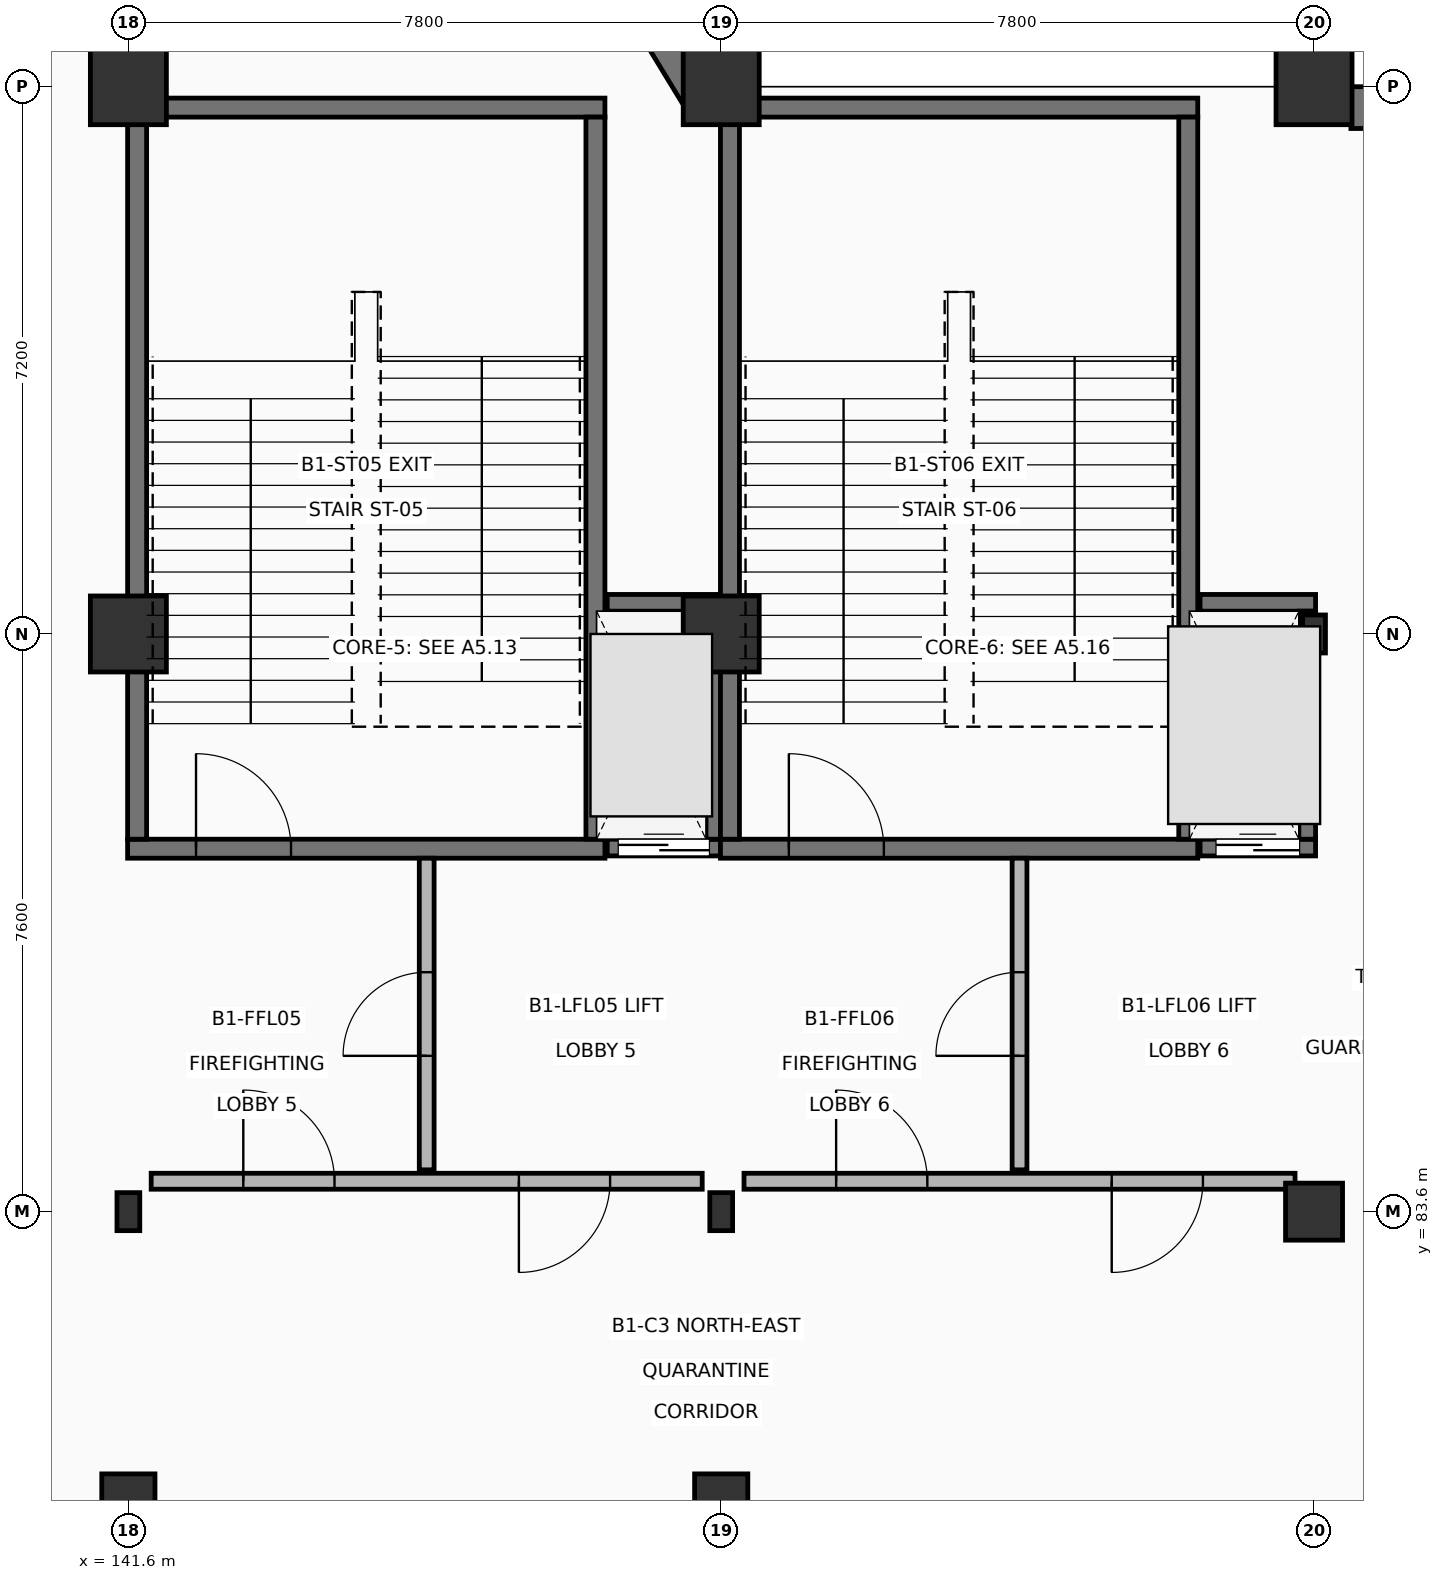
"""IFC4 building model, lengths in metres.
Left out: names, types, materials, properties, quantities, classifications, styles, units other than length and angle.
Written with IfcOpenShell. Run it as: python <this file> out.ifc"""

import sys

from ifc_helpers import new_model, si_unit, direction, frame, frame_2d, origin, origin_2d, place, context, subcontext, project, spatial, rectangle, hollow_rectangle, circle, extrude, element, fill, save


model = new_model("IFC4")
c1 = context("Model", 3, precision=1e-05, world=origin(), true_north=direction((0.0, 1.0)))
c2 = subcontext(c1, "Body", "Model", "MODEL_VIEW")
j1 = project(units=[si_unit("LENGTHUNIT", "METRE"), si_unit("PLANEANGLEUNIT", "RADIAN")], contexts=[c1])
p1 = place(None, origin())
s1 = spatial("IfcSite", under=j1, at=p1, CompositionType="ELEMENT")
p2 = place(p1, origin())
s2 = spatial("IfcBuilding", under=s1, at=p2, CompositionType="ELEMENT")
p3 = place(p2, frame((0.0, 0.0, -5.4)))
s3 = spatial("IfcBuildingStorey", under=s2, at=p3, CompositionType="ELEMENT", Elevation=-5.4)
p4 = place(p3, frame((141.6, 83.6, 0.0), z_axis=(0.0, 0.0, 1.0), x_axis=(1.0, 0.0, 0.0)))
e1 = element("IfcColumn", 1, at=p4, inside=s3, PredefinedType="COLUMN", context=c2, shape_type="SweptSolid", body=[
    extrude(hollow_rectangle(XDim=0.3, YDim=0.5, WallThickness=0.016, at=origin_2d()), origin(), (0.0, 0.0, 1.0), 5.4),
])
for number, where, z_axis, x_axis in (
    (2, (141.6, 91.2, 0.0), (0.0, 0.0, 1.0), (1.0, 0.0, 0.0)),
    (3, (141.6, 98.4, 0.0), (0.0, 0.0, 1.0), (1.0, 0.0, 0.0)),
):
    element("IfcColumn", number, at=place(p3, frame(where, z_axis=z_axis, x_axis=x_axis)), inside=s3, PredefinedType="COLUMN", context=c2, shape_type="SweptSolid", body=[
        extrude(rectangle(XDim=1.0, YDim=1.0, at=origin_2d()), origin(), (0.0, 0.0, 1.0), 5.4),
    ])
p5 = place(p3, frame((149.4, 83.6, 0.0), z_axis=(0.0, 0.0, 1.0), x_axis=(1.0, 0.0, 0.0)))
e4 = element("IfcColumn", 4, at=p5, inside=s3, PredefinedType="COLUMN", context=c2, shape_type="SweptSolid", body=[
    extrude(hollow_rectangle(XDim=0.3, YDim=0.5, WallThickness=0.016, at=origin_2d()), origin(), (0.0, 0.0, 1.0), 5.4),
])
for number, where, z_axis, x_axis in (
    (5, (149.4, 91.2, 0.0), (0.0, 0.0, 1.0), (1.0, 0.0, 0.0)),
    (6, (149.4, 98.4, 0.0), (0.0, 0.0, 1.0), (1.0, 0.0, 0.0)),
):
    element("IfcColumn", number, at=place(p3, frame(where, z_axis=z_axis, x_axis=x_axis)), inside=s3, PredefinedType="COLUMN", context=c2, shape_type="SweptSolid", body=[
        extrude(rectangle(XDim=1.0, YDim=1.0, at=origin_2d()), origin(), (0.0, 0.0, 1.0), 5.4),
    ])
p6 = place(p3, frame((157.2, 83.6, 0.0), z_axis=(0.0, 0.0, 1.0), x_axis=(1.0, 0.0, 0.0)))
e7 = element("IfcColumn", 7, at=p6, inside=s3, PredefinedType="COLUMN", context=c2, shape_type="SweptSolid", body=[
    extrude(circle(Radius=0.375, at=origin_2d()), origin(), (0.0, 0.0, 1.0), 5.4),
])
p7 = place(p3, frame((157.2, 91.2, 0.0), z_axis=(0.0, 0.0, 1.0), x_axis=(1.0, 0.0, 0.0)))
e8 = element("IfcColumn", 8, at=p7, inside=s3, PredefinedType="COLUMN", context=c2, shape_type="SweptSolid", body=[
    extrude(hollow_rectangle(XDim=0.3, YDim=0.5, WallThickness=0.016, at=origin_2d()), origin(), (0.0, 0.0, 1.0), 5.4),
])
p8 = place(p3, frame((157.2, 98.4, 0.0), z_axis=(0.0, 0.0, 1.0), x_axis=(1.0, 0.0, 0.0)))
e9 = element("IfcColumn", 9, at=p8, inside=s3, PredefinedType="COLUMN", context=c2, shape_type="SweptSolid", body=[
    extrude(rectangle(XDim=1.0, YDim=1.0, at=origin_2d()), origin(), (0.0, 0.0, 1.0), 5.4),
])
for number, where, z_axis, x_axis in (
    (10, (141.6, 79.8, 0.0), (0.0, 0.0, 1.0), (1.0, 0.0, 0.0)),
    (11, (149.4, 79.8, 0.0), (0.0, 0.0, 1.0), (1.0, 0.0, 0.0)),
):
    element("IfcColumn", number, at=place(p3, frame(where, z_axis=z_axis, x_axis=x_axis)), inside=s3, PredefinedType="COLUMN", context=c2, shape_type="SweptSolid", body=[
        extrude(rectangle(XDim=0.7, YDim=0.7, at=origin_2d()), origin(), (0.0, 0.0, 1.0), 5.4),
    ])
p9 = place(p3, frame((145.265, 104.657, 0.0), z_axis=(0.0, 0.0, 1.0), x_axis=(0.520390215294, -0.853928582392, 0.0)))
e12 = element("IfcWall", 12, at=p9, inside=s3, PredefinedType="USERDEFINED", context=c2, shape_type="SweptSolid", body=[
    extrude(rectangle(XDim=7.495, YDim=0.55, at=frame_2d((3.747, 0.0))), origin(), (0.0, 0.0, 1.0), 5.05),
])
p10 = place(p3, frame((157.685, 98.125, 0.0), z_axis=(0.0, 0.0, 1.0), x_axis=(1.0, 0.0, 0.0)))
e13 = element("IfcWall", 13, at=p10, inside=s3, PredefinedType="USERDEFINED", context=c2, shape_type="SweptSolid", body=[
    extrude(rectangle(XDim=6.83, YDim=0.55, at=frame_2d((3.415, 0.0))), origin(), (0.0, 0.0, 1.0), 5.05),
])
p11 = place(p3, frame((141.59, 88.375, 0.0), z_axis=(0.0, 0.0, 1.0), x_axis=(1.0, 0.0, 0.0)))
e14 = element("IfcWall", 14, at=p11, inside=s3, PredefinedType="SHEAR", context=c2, shape_type="SweptSolid", body=[
    extrude(rectangle(XDim=6.28, YDim=0.25, at=frame_2d((3.14, 0.0))), origin(), (0.0, 0.0, 1.0), 5.05),
])
p12 = place(p11, frame((0.9, 0.0, 0.0)))
e15 = element("IfcOpeningElement", 15, at=p12, cuts=e14, PredefinedType="OPENING", context=c2, shape_type="SweptSolid", body=[
    extrude(rectangle(XDim=1.25, YDim=2.2, at=frame_2d((0.625, 1.1))), frame((0.0, 0.135, 0.0), z_axis=(0.0, -1.0, 0.0), x_axis=(1.0, 0.0, 0.0)), (0.0, 0.0, 1.0), 0.27),
])
p13 = place(p3, frame((141.59, 98.125, 0.0), z_axis=(0.0, 0.0, 1.0), x_axis=(1.0, 0.0, 0.0)))
e16 = element("IfcWall", 16, at=p13, inside=s3, PredefinedType="SHEAR", context=c2, shape_type="SweptSolid", body=[
    extrude(rectangle(XDim=6.28, YDim=0.25, at=frame_2d((3.14, 0.0))), origin(), (0.0, 0.0, 1.0), 5.05),
])
for number, where, z_axis, x_axis in (
    (17, (141.715, 88.5, 0.0), (0.0, 0.0, 1.0), (0.0, 1.0, 0.0)),
    (18, (147.745, 88.5, 0.0), (0.0, 0.0, 1.0), (0.0, 1.0, 0.0)),
):
    element("IfcWall", number, at=place(p3, frame(where, z_axis=z_axis, x_axis=x_axis)), inside=s3, PredefinedType="SHEAR", context=c2, shape_type="SweptSolid", body=[
        extrude(rectangle(XDim=9.5, YDim=0.25, at=frame_2d((4.75, 0.0))), origin(), (0.0, 0.0, 1.0), 5.05),
    ])
p14 = place(p3, frame((147.9, 88.39, 0.0), z_axis=(0.0, 0.0, 1.0), x_axis=(1.0, 0.0, 0.0)))
e19 = element("IfcWall", 19, at=p14, inside=s3, PredefinedType="SHEAR", context=c2, shape_type="SweptSolid", body=[
    extrude(rectangle(XDim=1.49, YDim=0.22, at=frame_2d((0.745, 0.0))), origin(), (0.0, 0.0, 1.0), 5.05),
])
p15 = place(p14, frame((0.145, 0.0, 0.0)))
e20 = element("IfcOpeningElement", 20, at=p15, cuts=e19, PredefinedType="OPENING", context=c2, shape_type="SweptSolid", body=[
    extrude(rectangle(XDim=1.2, YDim=2.2, at=frame_2d((0.6, 1.1))), frame((0.0, 0.12, 0.0), z_axis=(0.0, -1.0, 0.0), x_axis=(1.0, 0.0, 0.0)), (0.0, 0.0, 1.0), 0.24),
])
p16 = place(p3, frame((147.9, 91.61, 0.0), z_axis=(0.0, 0.0, 1.0), x_axis=(1.0, 0.0, 0.0)))
e21 = element("IfcWall", 21, at=p16, inside=s3, PredefinedType="SHEAR", context=c2, shape_type="SweptSolid", body=[
    extrude(rectangle(XDim=1.49, YDim=0.22, at=frame_2d((0.745, 0.0))), origin(), (0.0, 0.0, 1.0), 5.05),
])
p17 = place(p3, frame((149.31, 88.5, 0.0), z_axis=(0.0, 0.0, 1.0), x_axis=(0.0, 1.0, 0.0)))
e22 = element("IfcWall", 22, at=p17, inside=s3, PredefinedType="SHEAR", context=c2, shape_type="SweptSolid", body=[
    extrude(rectangle(XDim=3.0, YDim=0.22, at=frame_2d((1.5, 0.0))), origin(), (0.0, 0.0, 1.0), 5.05),
])
p18 = place(p3, frame((141.9, 84.0, 0.0), z_axis=(0.0, 0.0, 1.0), x_axis=(1.0, 0.0, 0.0)))
e23 = element("IfcWall", 23, at=p18, inside=s3, PredefinedType="PARTITIONING", context=c2, shape_type="SweptSolid", body=[
    extrude(rectangle(XDim=7.25, YDim=0.21, at=frame_2d((3.625, 0.0))), origin(), (0.0, 0.0, 1.0), 5.05),
])
p19 = place(p18, frame((1.212, 0.0, 0.0)))
e24 = element("IfcOpeningElement", 24, at=p19, cuts=e23, PredefinedType="OPENING", context=c2, shape_type="SweptSolid", body=[
    extrude(rectangle(XDim=1.2, YDim=2.2, at=frame_2d((0.6, 1.1))), frame((0.0, 0.115, 0.0), z_axis=(0.0, -1.0, 0.0), x_axis=(1.0, 0.0, 0.0)), (0.0, 0.0, 1.0), 0.23),
])
p20 = place(p18, frame((4.838, 0.0, 0.0)))
e25 = element("IfcOpeningElement", 25, at=p20, cuts=e23, PredefinedType="OPENING", context=c2, shape_type="SweptSolid", body=[
    extrude(rectangle(XDim=1.2, YDim=2.2, at=frame_2d((0.6, 1.1))), frame((0.0, 0.115, 0.0), z_axis=(0.0, -1.0, 0.0), x_axis=(1.0, 0.0, 0.0)), (0.0, 0.0, 1.0), 0.23),
])
p21 = place(p3, frame((145.525, 84.15, 0.0), z_axis=(0.0, 0.0, 1.0), x_axis=(0.0, 1.0, 0.0)))
e26 = element("IfcWall", 26, at=p21, inside=s3, PredefinedType="PARTITIONING", context=c2, shape_type="SweptSolid", body=[
    extrude(rectangle(XDim=4.1, YDim=0.195, at=frame_2d((2.05, 0.0))), origin(), (0.0, 0.0, 1.0), 5.05),
])
p22 = place(p21, frame((1.5, 0.0, 0.0)))
e27 = element("IfcOpeningElement", 27, at=p22, cuts=e26, PredefinedType="OPENING", context=c2, shape_type="SweptSolid", body=[
    extrude(rectangle(XDim=1.1, YDim=2.15, at=frame_2d((0.55, 1.075))), frame((0.0, 0.107, 0.0), z_axis=(0.0, -1.0, 0.0), x_axis=(1.0, 0.0, 0.0)), (0.0, 0.0, 1.0), 0.215),
])
p23 = place(p3, frame((149.39, 88.375, 0.0), z_axis=(0.0, 0.0, 1.0), x_axis=(1.0, 0.0, 0.0)))
e28 = element("IfcWall", 28, at=p23, inside=s3, PredefinedType="SHEAR", context=c2, shape_type="SweptSolid", body=[
    extrude(rectangle(XDim=6.28, YDim=0.25, at=frame_2d((3.14, 0.0))), origin(), (0.0, 0.0, 1.0), 5.05),
])
p24 = place(p23, frame((0.9, 0.0, 0.0)))
e29 = element("IfcOpeningElement", 29, at=p24, cuts=e28, PredefinedType="OPENING", context=c2, shape_type="SweptSolid", body=[
    extrude(rectangle(XDim=1.25, YDim=2.2, at=frame_2d((0.625, 1.1))), frame((0.0, 0.135, 0.0), z_axis=(0.0, -1.0, 0.0), x_axis=(1.0, 0.0, 0.0)), (0.0, 0.0, 1.0), 0.27),
])
p25 = place(p3, frame((149.39, 98.125, 0.0), z_axis=(0.0, 0.0, 1.0), x_axis=(1.0, 0.0, 0.0)))
e30 = element("IfcWall", 30, at=p25, inside=s3, PredefinedType="SHEAR", context=c2, shape_type="SweptSolid", body=[
    extrude(rectangle(XDim=6.28, YDim=0.25, at=frame_2d((3.14, 0.0))), origin(), (0.0, 0.0, 1.0), 5.05),
])
for number, where, z_axis, x_axis in (
    (31, (149.515, 88.5, 0.0), (0.0, 0.0, 1.0), (0.0, 1.0, 0.0)),
    (32, (155.545, 88.5, 0.0), (0.0, 0.0, 1.0), (0.0, 1.0, 0.0)),
):
    element("IfcWall", number, at=place(p3, frame(where, z_axis=z_axis, x_axis=x_axis)), inside=s3, PredefinedType="SHEAR", context=c2, shape_type="SweptSolid", body=[
        extrude(rectangle(XDim=9.5, YDim=0.25, at=frame_2d((4.75, 0.0))), origin(), (0.0, 0.0, 1.0), 5.05),
    ])
p26 = place(p3, frame((155.7, 88.39, 0.0), z_axis=(0.0, 0.0, 1.0), x_axis=(1.0, 0.0, 0.0)))
e33 = element("IfcWall", 33, at=p26, inside=s3, PredefinedType="SHEAR", context=c2, shape_type="SweptSolid", body=[
    extrude(rectangle(XDim=1.52, YDim=0.22, at=frame_2d((0.76, 0.0))), origin(), (0.0, 0.0, 1.0), 5.05),
])
p27 = place(p26, frame((0.21, 0.0, 0.0)))
e34 = element("IfcOpeningElement", 34, at=p27, cuts=e33, PredefinedType="OPENING", context=c2, shape_type="SweptSolid", body=[
    extrude(rectangle(XDim=1.1, YDim=2.15, at=frame_2d((0.55, 1.075))), frame((0.0, 0.12, 0.0), z_axis=(0.0, -1.0, 0.0), x_axis=(1.0, 0.0, 0.0)), (0.0, 0.0, 1.0), 0.24),
])
p28 = place(p3, frame((155.7, 91.61, 0.0), z_axis=(0.0, 0.0, 1.0), x_axis=(1.0, 0.0, 0.0)))
e35 = element("IfcWall", 35, at=p28, inside=s3, PredefinedType="SHEAR", context=c2, shape_type="SweptSolid", body=[
    extrude(rectangle(XDim=1.52, YDim=0.22, at=frame_2d((0.76, 0.0))), origin(), (0.0, 0.0, 1.0), 5.05),
])
p29 = place(p3, frame((157.11, 88.5, 0.0), z_axis=(0.0, 0.0, 1.0), x_axis=(0.0, 1.0, 0.0)))
e36 = element("IfcWall", 36, at=p29, inside=s3, PredefinedType="SHEAR", context=c2, shape_type="SweptSolid", body=[
    extrude(rectangle(XDim=3.0, YDim=0.22, at=frame_2d((1.5, 0.0))), origin(), (0.0, 0.0, 1.0), 5.05),
])
p30 = place(p3, frame((149.7, 84.0, 0.0), z_axis=(0.0, 0.0, 1.0), x_axis=(1.0, 0.0, 0.0)))
e37 = element("IfcWall", 37, at=p30, inside=s3, PredefinedType="PARTITIONING", context=c2, shape_type="SweptSolid", body=[
    extrude(rectangle(XDim=7.25, YDim=0.21, at=frame_2d((3.625, 0.0))), origin(), (0.0, 0.0, 1.0), 5.05),
])
p31 = place(p30, frame((1.212, 0.0, 0.0)))
e38 = element("IfcOpeningElement", 38, at=p31, cuts=e37, PredefinedType="OPENING", context=c2, shape_type="SweptSolid", body=[
    extrude(rectangle(XDim=1.2, YDim=2.2, at=frame_2d((0.6, 1.1))), frame((0.0, 0.115, 0.0), z_axis=(0.0, -1.0, 0.0), x_axis=(1.0, 0.0, 0.0)), (0.0, 0.0, 1.0), 0.23),
])
p32 = place(p30, frame((4.838, 0.0, 0.0)))
e39 = element("IfcOpeningElement", 39, at=p32, cuts=e37, PredefinedType="OPENING", context=c2, shape_type="SweptSolid", body=[
    extrude(rectangle(XDim=1.2, YDim=2.2, at=frame_2d((0.6, 1.1))), frame((0.0, 0.115, 0.0), z_axis=(0.0, -1.0, 0.0), x_axis=(1.0, 0.0, 0.0)), (0.0, 0.0, 1.0), 0.23),
])
p33 = place(p3, frame((153.325, 84.15, 0.0), z_axis=(0.0, 0.0, 1.0), x_axis=(0.0, 1.0, 0.0)))
e40 = element("IfcWall", 40, at=p33, inside=s3, PredefinedType="PARTITIONING", context=c2, shape_type="SweptSolid", body=[
    extrude(rectangle(XDim=4.1, YDim=0.195, at=frame_2d((2.05, 0.0))), origin(), (0.0, 0.0, 1.0), 5.05),
])
p34 = place(p33, frame((1.5, 0.0, 0.0)))
e41 = element("IfcOpeningElement", 41, at=p34, cuts=e40, PredefinedType="OPENING", context=c2, shape_type="SweptSolid", body=[
    extrude(rectangle(XDim=1.1, YDim=2.15, at=frame_2d((0.55, 1.075))), frame((0.0, 0.107, 0.0), z_axis=(0.0, -1.0, 0.0), x_axis=(1.0, 0.0, 0.0)), (0.0, 0.0, 1.0), 0.215),
])
p35 = place(p12, origin())
e42 = element("IfcDoor", 42, at=p35, inside=s3, OperationType="SINGLE_SWING_LEFT", PredefinedType="DOOR", context=c2, shape_type="SweptSolid", body=[
    extrude(rectangle(XDim=1.25, YDim=2.2, at=frame_2d((0.625, 1.1))), frame((0.0, 0.025, 0.0), z_axis=(0.0, -1.0, 0.0), x_axis=(1.0, 0.0, 0.0)), (0.0, 0.0, 1.0), 0.05),
])
fill(e15, e42)
p36 = place(p15, origin())
e43 = element("IfcDoor", 43, at=p36, inside=s3, OperationType="DOUBLE_DOOR_SLIDING", PredefinedType="DOOR", context=c2, shape_type="SweptSolid", body=[
    extrude(rectangle(XDim=1.2, YDim=2.2, at=frame_2d((0.6, 1.1))), frame((0.0, 0.025, 0.0), z_axis=(0.0, -1.0, 0.0), x_axis=(1.0, 0.0, 0.0)), (0.0, 0.0, 1.0), 0.05),
])
fill(e20, e43)
p37 = place(p19, origin())
e44 = element("IfcDoor", 44, at=p37, inside=s3, OperationType="SINGLE_SWING_LEFT", PredefinedType="DOOR", context=c2, shape_type="SweptSolid", body=[
    extrude(rectangle(XDim=1.2, YDim=2.2, at=frame_2d((0.6, 1.1))), frame((0.0, 0.025, 0.0), z_axis=(0.0, -1.0, 0.0), x_axis=(1.0, 0.0, 0.0)), (0.0, 0.0, 1.0), 0.05),
])
fill(e24, e44)
p38 = place(p20, origin())
e45 = element("IfcDoor", 45, at=p38, inside=s3, OperationType="SINGLE_SWING_RIGHT", PredefinedType="DOOR", context=c2, shape_type="SweptSolid", body=[
    extrude(rectangle(XDim=1.2, YDim=2.2, at=frame_2d((0.6, 1.1))), frame((0.0, 0.025, 0.0), z_axis=(0.0, -1.0, 0.0), x_axis=(1.0, 0.0, 0.0)), (0.0, 0.0, 1.0), 0.05),
])
fill(e25, e45)
p39 = place(p22, origin())
e46 = element("IfcDoor", 46, at=p39, inside=s3, OperationType="SINGLE_SWING_LEFT", PredefinedType="DOOR", context=c2, shape_type="SweptSolid", body=[
    extrude(rectangle(XDim=1.1, YDim=2.15, at=frame_2d((0.55, 1.075))), frame((0.0, 0.025, 0.0), z_axis=(0.0, -1.0, 0.0), x_axis=(1.0, 0.0, 0.0)), (0.0, 0.0, 1.0), 0.05),
])
fill(e27, e46)
p40 = place(p24, origin())
e47 = element("IfcDoor", 47, at=p40, inside=s3, OperationType="SINGLE_SWING_LEFT", PredefinedType="DOOR", context=c2, shape_type="SweptSolid", body=[
    extrude(rectangle(XDim=1.25, YDim=2.2, at=frame_2d((0.625, 1.1))), frame((0.0, 0.025, 0.0), z_axis=(0.0, -1.0, 0.0), x_axis=(1.0, 0.0, 0.0)), (0.0, 0.0, 1.0), 0.05),
])
fill(e29, e47)
p41 = place(p27, origin())
e48 = element("IfcDoor", 48, at=p41, inside=s3, OperationType="DOUBLE_DOOR_SLIDING", PredefinedType="DOOR", context=c2, shape_type="SweptSolid", body=[
    extrude(rectangle(XDim=1.1, YDim=2.15, at=frame_2d((0.55, 1.075))), frame((0.0, 0.025, 0.0), z_axis=(0.0, -1.0, 0.0), x_axis=(1.0, 0.0, 0.0)), (0.0, 0.0, 1.0), 0.05),
])
fill(e34, e48)
p42 = place(p31, origin())
e49 = element("IfcDoor", 49, at=p42, inside=s3, OperationType="SINGLE_SWING_LEFT", PredefinedType="DOOR", context=c2, shape_type="SweptSolid", body=[
    extrude(rectangle(XDim=1.2, YDim=2.2, at=frame_2d((0.6, 1.1))), frame((0.0, 0.025, 0.0), z_axis=(0.0, -1.0, 0.0), x_axis=(1.0, 0.0, 0.0)), (0.0, 0.0, 1.0), 0.05),
])
fill(e38, e49)
p43 = place(p32, origin())
e50 = element("IfcDoor", 50, at=p43, inside=s3, OperationType="SINGLE_SWING_RIGHT", PredefinedType="DOOR", context=c2, shape_type="SweptSolid", body=[
    extrude(rectangle(XDim=1.2, YDim=2.2, at=frame_2d((0.6, 1.1))), frame((0.0, 0.025, 0.0), z_axis=(0.0, -1.0, 0.0), x_axis=(1.0, 0.0, 0.0)), (0.0, 0.0, 1.0), 0.05),
])
fill(e39, e50)
p44 = place(p34, origin())
e51 = element("IfcDoor", 51, at=p44, inside=s3, OperationType="SINGLE_SWING_LEFT", PredefinedType="DOOR", context=c2, shape_type="SweptSolid", body=[
    extrude(rectangle(XDim=1.1, YDim=2.15, at=frame_2d((0.55, 1.075))), frame((0.0, 0.025, 0.0), z_axis=(0.0, -1.0, 0.0), x_axis=(1.0, 0.0, 0.0)), (0.0, 0.0, 1.0), 0.05),
])
fill(e41, e51)
save(model, sys.argv[1])
